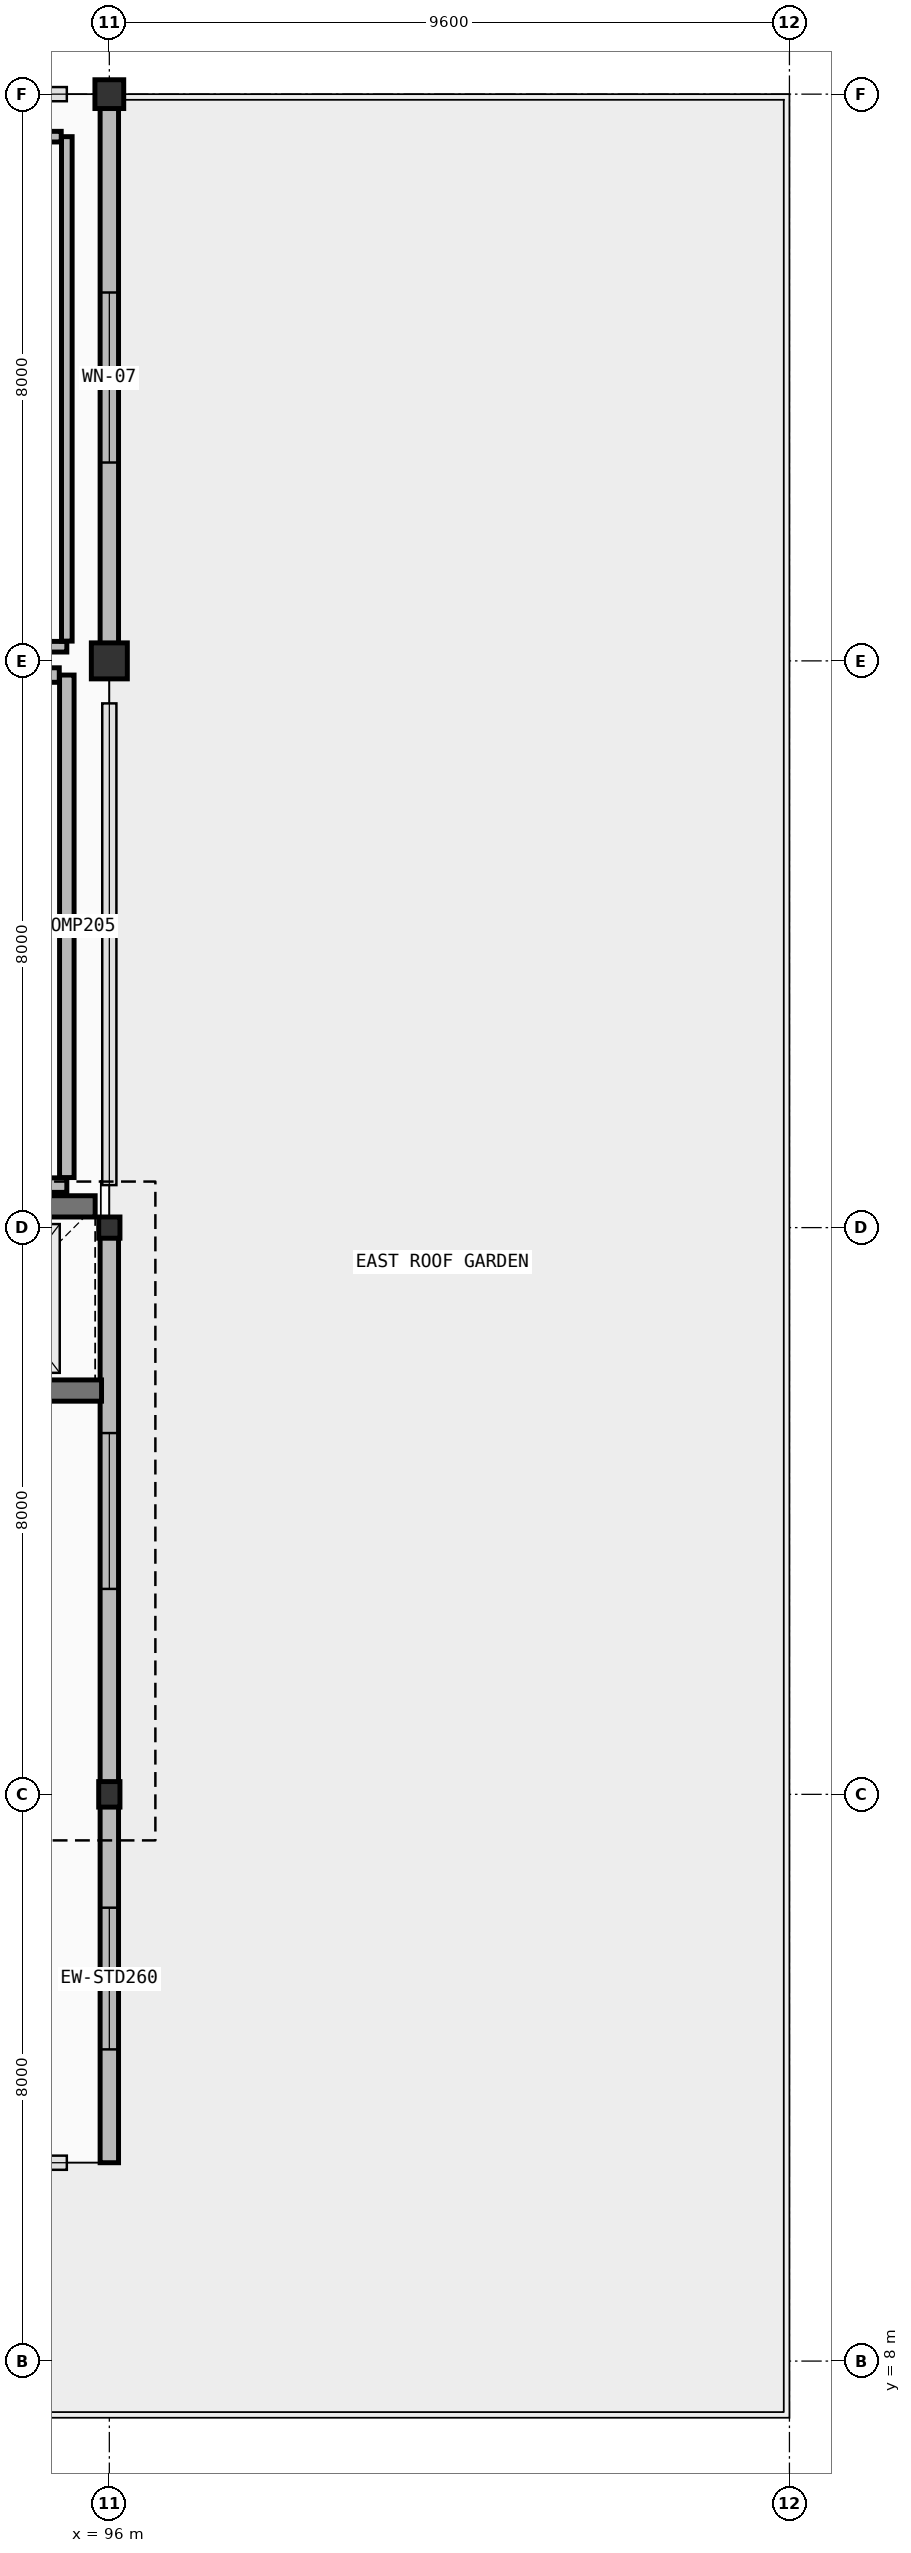
"""IFC4 building model, lengths in metres.
Left out: names, types, materials, properties, quantities, classifications, styles, units other than length and angle.
Written with IfcOpenShell. Run it as: python <this file> out.ifc"""

import sys

from ifc_helpers import new_model, si_unit, direction, frame, frame_2d, origin, origin_2d, place, context, subcontext, project, spatial, rectangle, hollow_circle, i_section, extrude, element, fill, save


model = new_model("IFC4")
c1 = context("Model", 3, precision=1e-05, world=origin(), true_north=direction((0.0, 1.0)))
c2 = subcontext(c1, "Body", "Model", "MODEL_VIEW")
j1 = project(units=[si_unit("LENGTHUNIT", "METRE"), si_unit("PLANEANGLEUNIT", "RADIAN")], contexts=[c1])
p1 = place(None, origin())
s1 = spatial("IfcSite", under=j1, at=p1, CompositionType="ELEMENT")
p2 = place(p1, origin())
s2 = spatial("IfcBuilding", under=s1, at=p2, CompositionType="ELEMENT")
p3 = place(p2, frame((0.0, 0.0, 24.9)))
s3 = spatial("IfcBuildingStorey", under=s2, at=p3, CompositionType="ELEMENT", Elevation=24.9)
p4 = place(p3, frame((96.0, 16.0, 0.0), z_axis=(0.0, 0.0, 1.0), x_axis=(1.0, 0.0, 0.0)))
e1 = element("IfcColumn", 1, at=p4, inside=s3, PredefinedType="COLUMN", context=c2, shape_type="SweptSolid", body=[
    extrude(i_section(OverallWidth=0.3, OverallDepth=0.36, WebThickness=0.012, FlangeThickness=0.022, FilletRadius=0.027, at=origin_2d()), origin(), (0.0, 0.0, 1.0), 4.5),
])
p5 = place(p3, frame((96.0, 24.0, 0.0), z_axis=(0.0, 0.0, 1.0), x_axis=(1.0, 0.0, 0.0)))
e2 = element("IfcColumn", 2, at=p5, inside=s3, PredefinedType="COLUMN", context=c2, shape_type="SweptSolid", body=[
    extrude(i_section(OverallWidth=0.3, OverallDepth=0.3, WebThickness=0.011, FlangeThickness=0.019, FilletRadius=0.027, at=origin_2d()), origin(), (0.0, 0.0, 1.0), 4.5),
])
p6 = place(p3, frame((96.0, 32.0, 0.0), z_axis=(0.0, 0.0, 1.0), x_axis=(1.0, 0.0, 0.0)))
e3 = element("IfcColumn", 3, at=p6, inside=s3, PredefinedType="COLUMN", context=c2, shape_type="SweptSolid", body=[
    extrude(hollow_circle(Radius=0.254, WallThickness=0.025, at=origin_2d()), origin(), (0.0, 0.0, 1.0), 4.5),
])
p7 = place(p3, frame((96.0, 40.0, 0.0), z_axis=(0.0, 0.0, 1.0), x_axis=(1.0, 0.0, 0.0)))
e4 = element("IfcColumn", 4, at=p7, inside=s3, PredefinedType="COLUMN", context=c2, shape_type="SweptSolid", body=[
    extrude(hollow_circle(Radius=0.203, WallThickness=0.02, at=origin_2d()), origin(), (0.0, 0.0, 1.0), 4.5),
])
p8 = place(p3, frame((96.0, 10.8, 0.0), z_axis=(0.0, 0.0, 1.0), x_axis=(0.0, 1.0, 0.0)))
e5 = element("IfcWall", 5, at=p8, inside=s3, PredefinedType="STANDARD", context=c2, shape_type="SweptSolid", body=[
    extrude(rectangle(XDim=5.2, YDim=0.26, at=frame_2d((2.6, 0.0))), origin(), (0.0, 0.0, 1.0), 4.26),
])
p9 = place(p8, frame((1.6, 0.0, 0.9)))
e6 = element("IfcOpeningElement", 6, at=p9, cuts=e5, PredefinedType="OPENING", context=c2, shape_type="SweptSolid", body=[
    extrude(rectangle(XDim=2.0, YDim=2.1, at=frame_2d((1.0, 1.05))), frame((0.0, 0.14, 0.0), z_axis=(0.0, -1.0, 0.0), x_axis=(1.0, 0.0, 0.0)), (0.0, 0.0, 1.0), 0.28),
])
p10 = place(p3, frame((96.0, 16.0, 0.0), z_axis=(0.0, 0.0, 1.0), x_axis=(0.0, 1.0, 0.0)))
e7 = element("IfcWall", 7, at=p10, inside=s3, PredefinedType="STANDARD", context=c2, shape_type="SweptSolid", body=[
    extrude(rectangle(XDim=8.0, YDim=0.26, at=frame_2d((4.0, 0.0))), origin(), (0.0, 0.0, 1.0), 3.84),
])
p11 = place(p10, frame((2.9, 0.0, 0.9)))
e8 = element("IfcOpeningElement", 8, at=p11, cuts=e7, PredefinedType="OPENING", context=c2, shape_type="SweptSolid", body=[
    extrude(rectangle(XDim=2.2, YDim=2.15, at=frame_2d((1.1, 1.075))), frame((0.0, 0.14, 0.0), z_axis=(0.0, -1.0, 0.0), x_axis=(1.0, 0.0, 0.0)), (0.0, 0.0, 1.0), 0.28),
])
p12 = place(p3, frame((96.0, 32.0, 0.0), z_axis=(0.0, 0.0, 1.0), x_axis=(0.0, 1.0, 0.0)))
e9 = element("IfcWall", 9, at=p12, inside=s3, PredefinedType="STANDARD", context=c2, shape_type="SweptSolid", body=[
    extrude(rectangle(XDim=8.0, YDim=0.26, at=frame_2d((4.0, 0.0))), origin(), (0.0, 0.0, 1.0), 3.83),
])
p13 = place(p12, frame((2.8, 0.0, 0.9)))
e10 = element("IfcOpeningElement", 10, at=p13, cuts=e9, PredefinedType="OPENING", context=c2, shape_type="SweptSolid", body=[
    extrude(rectangle(XDim=2.4, YDim=2.2, at=frame_2d((1.2, 1.1))), frame((0.0, 0.14, 0.0), z_axis=(0.0, -1.0, 0.0), x_axis=(1.0, 0.0, 0.0)), (0.0, 0.0, 1.0), 0.28),
])
p14 = place(p3, frame((95.8, 24.3, 0.0), z_axis=(0.0, 0.0, 1.0), x_axis=(-1.0, 0.0, 0.0)))
e11 = element("IfcWall", 11, at=p14, inside=s3, PredefinedType="SHEAR", context=c2, shape_type="SweptSolid", body=[
    extrude(rectangle(XDim=2.6, YDim=0.3, at=frame_2d((1.3, 0.0))), origin(), (0.0, 0.0, 1.0), 4.26),
])
p15 = place(p3, frame((94.11, 21.7, 0.0), z_axis=(0.0, 0.0, 1.0), x_axis=(1.0, 0.0, 0.0)))
e12 = element("IfcWall", 12, at=p15, inside=s3, PredefinedType="SHEAR", context=c2, shape_type="SweptSolid", body=[
    extrude(rectangle(XDim=1.78, YDim=0.3, at=frame_2d((0.89, 0.0))), origin(), (0.0, 0.0, 1.0), 4.27),
])
p16 = place(p3, frame((86.306, 24.6, 0.0), z_axis=(0.0, 0.0, 1.0), x_axis=(1.0, 0.0, 0.0)))
e13 = element("IfcWall", 13, at=p16, inside=s3, PredefinedType="SOLIDWALL", context=c2, shape_type="SweptSolid", body=[
    extrude(rectangle(XDim=9.094, YDim=0.205, at=frame_2d((4.547, 0.0))), origin(), (0.0, 0.0, 1.0), 3.54),
])
p17 = place(p3, frame((95.4, 24.707, 0.0), z_axis=(0.0, 0.0, 1.0), x_axis=(0.0, 1.0, 0.0)))
e14 = element("IfcWall", 14, at=p17, inside=s3, PredefinedType="SOLIDWALL", context=c2, shape_type="SweptSolid", body=[
    extrude(rectangle(XDim=7.094, YDim=0.205, at=frame_2d((3.547, 0.0))), origin(), (0.0, 0.0, 1.0), 4.26),
])
p18 = place(p3, frame((95.293, 31.8, 0.0), z_axis=(0.0, 0.0, 1.0), x_axis=(-1.0, 0.0, 0.0)))
e15 = element("IfcWall", 15, at=p18, inside=s3, PredefinedType="SOLIDWALL", context=c2, shape_type="SweptSolid", body=[
    extrude(rectangle(XDim=8.707, YDim=0.205, at=frame_2d((4.354, 0.0))), origin(), (0.0, 0.0, 1.0), 3.84),
])
p19 = place(p3, frame((86.559, 32.2, 0.0), z_axis=(0.0, 0.0, 1.0), x_axis=(1.0, 0.0, 0.0)))
e16 = element("IfcWall", 16, at=p19, inside=s3, PredefinedType="PARTITIONING", context=c2, shape_type="SweptSolid", body=[
    extrude(rectangle(XDim=8.841, YDim=0.15, at=frame_2d((4.42, 0.0))), origin(), (0.0, 0.0, 1.0), 3.84),
])
p20 = place(p3, frame((95.4, 32.279, 0.0), z_axis=(0.0, 0.0, 1.0), x_axis=(0.0, 1.0, 0.0)))
e17 = element("IfcWall", 17, at=p20, inside=s3, PredefinedType="PARTITIONING", context=c2, shape_type="SweptSolid", body=[
    extrude(rectangle(XDim=7.121, YDim=0.15, at=frame_2d((3.561, 0.0))), origin(), (0.0, 0.0, 1.0), 4.26),
])
p21 = place(p3, frame((95.321, 39.4, 0.0), z_axis=(0.0, 0.0, 1.0), x_axis=(-1.0, 0.0, 0.0)))
e18 = element("IfcWall", 18, at=p21, inside=s3, PredefinedType="PARTITIONING", context=c2, shape_type="SweptSolid", body=[
    extrude(rectangle(XDim=9.042, YDim=0.15, at=frame_2d((4.521, 0.0))), origin(), (0.0, 0.0, 1.0), 3.63),
])
p22 = place(p9, origin())
e19 = element("IfcWindow", 19, at=p22, inside=s3, PartitioningType="SINGLE_PANEL", PredefinedType="WINDOW", context=c2, shape_type="SweptSolid", body=[
    extrude(rectangle(XDim=2.0, YDim=2.1, at=frame_2d((1.0, 1.05))), frame((0.0, 0.03, 0.0), z_axis=(0.0, -1.0, 0.0), x_axis=(1.0, 0.0, 0.0)), (0.0, 0.0, 1.0), 0.06),
])
fill(e6, e19)
p23 = place(p11, origin())
e20 = element("IfcWindow", 20, at=p23, inside=s3, PartitioningType="SINGLE_PANEL", PredefinedType="WINDOW", context=c2, shape_type="SweptSolid", body=[
    extrude(rectangle(XDim=2.2, YDim=2.15, at=frame_2d((1.1, 1.075))), frame((0.0, 0.03, 0.0), z_axis=(0.0, -1.0, 0.0), x_axis=(1.0, 0.0, 0.0)), (0.0, 0.0, 1.0), 0.06),
])
fill(e8, e20)
p24 = place(p13, origin())
e21 = element("IfcWindow", 21, at=p24, inside=s3, PartitioningType="SINGLE_PANEL", PredefinedType="WINDOW", context=c2, shape_type="SweptSolid", body=[
    extrude(rectangle(XDim=2.4, YDim=2.2, at=frame_2d((1.2, 1.1))), frame((0.0, 0.03, 0.0), z_axis=(0.0, -1.0, 0.0), x_axis=(1.0, 0.0, 0.0)), (0.0, 0.0, 1.0), 0.06),
])
fill(e10, e21)
save(model, sys.argv[1])
